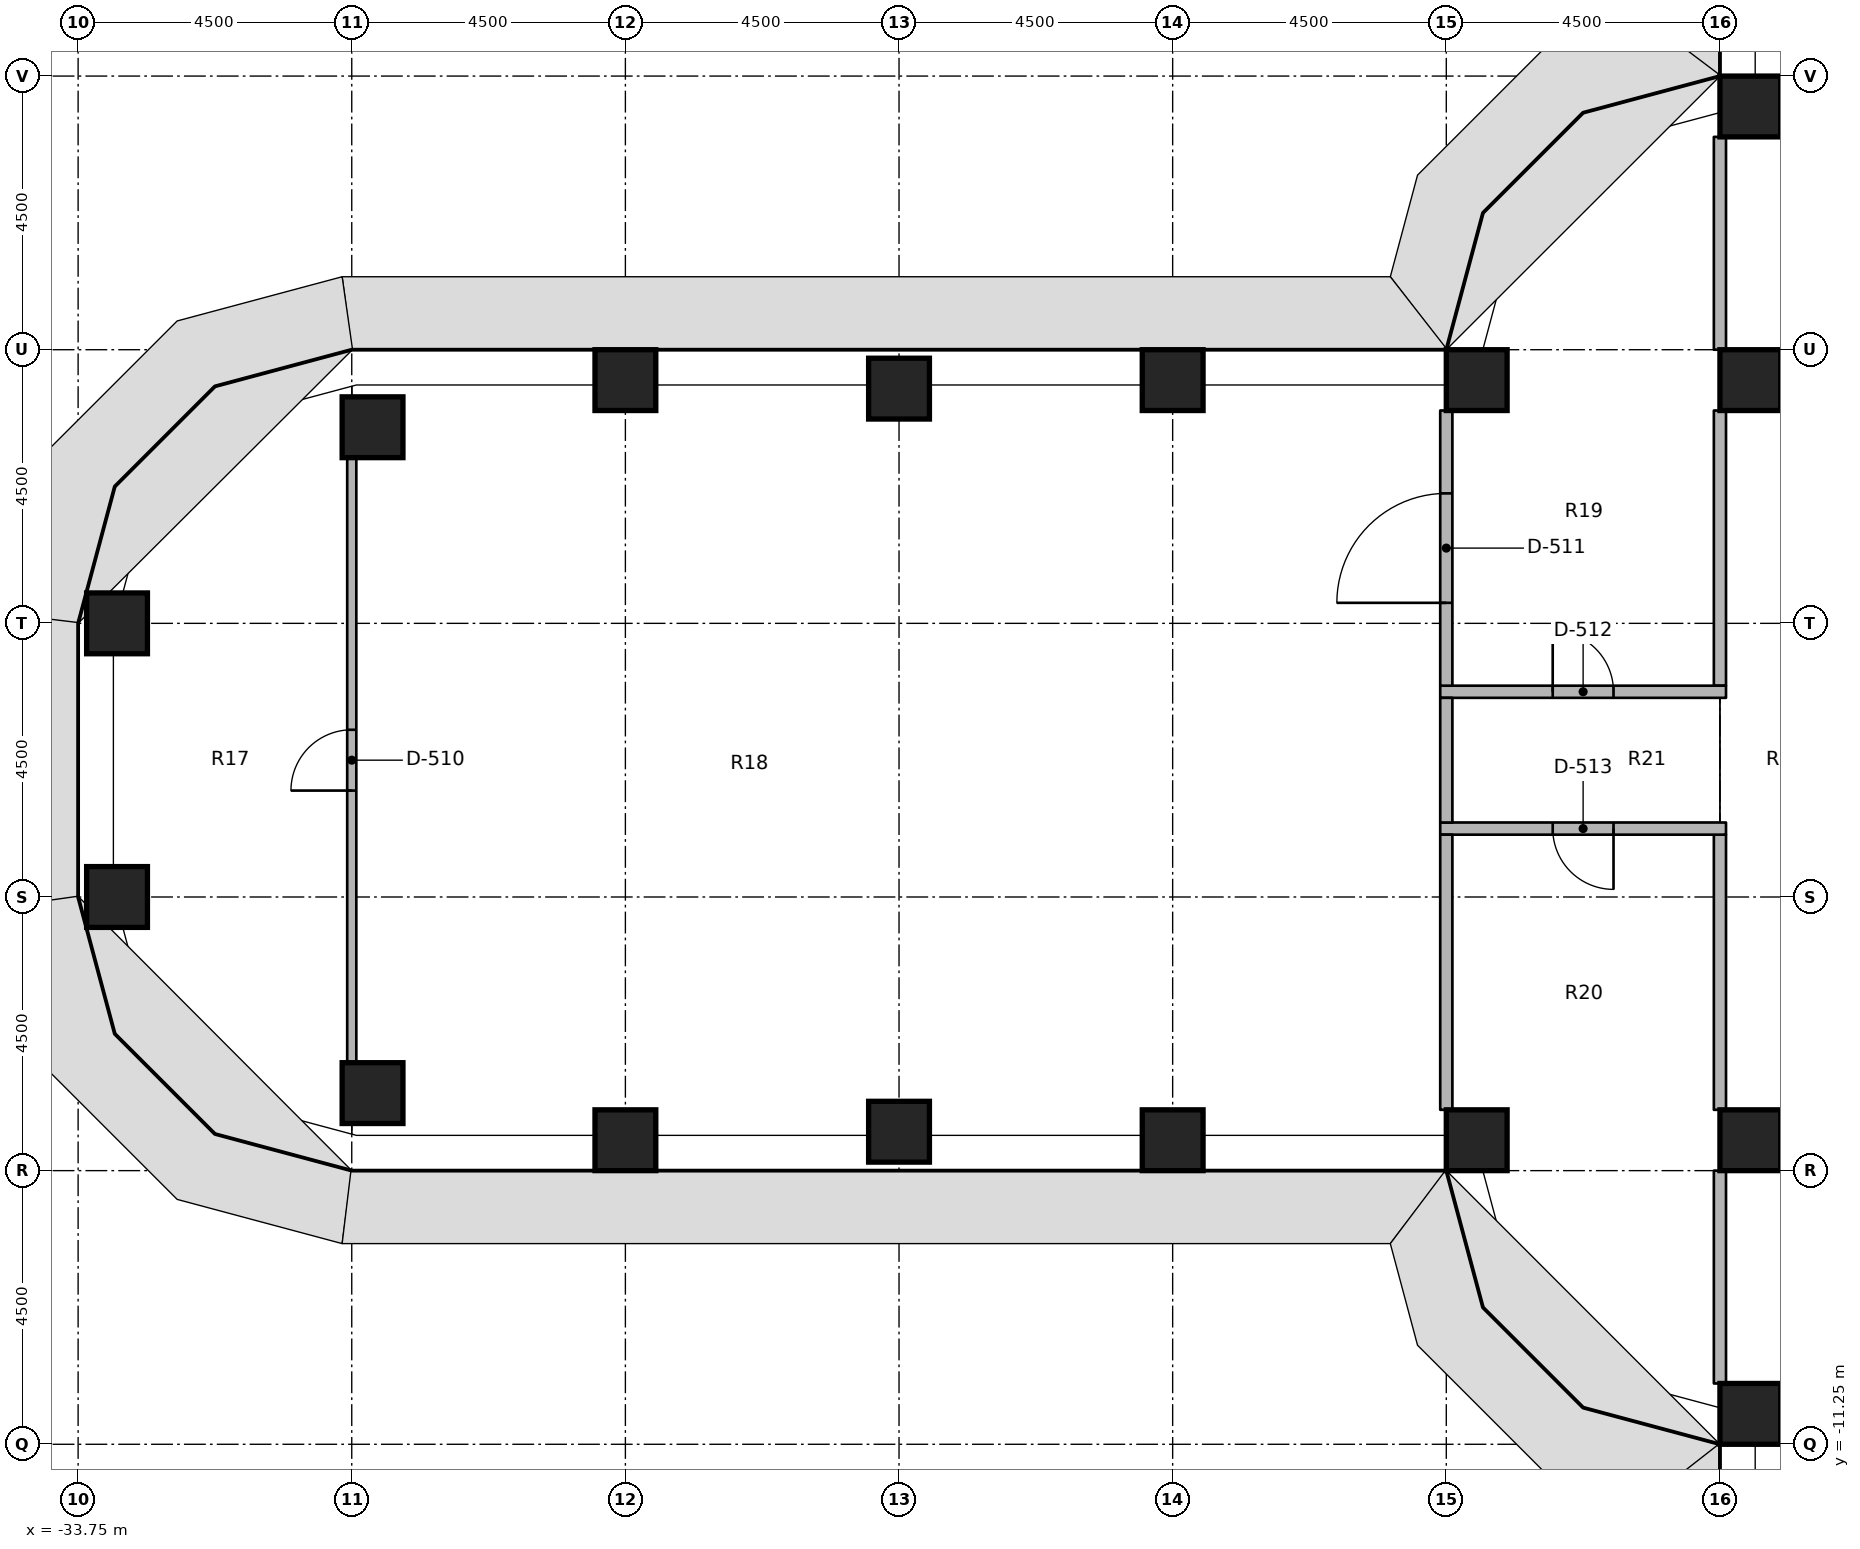
"""IFC4 building model, lengths in metres.
Left out: names, types, materials, properties, quantities, classifications, styles, units other than length and angle.
Written with IfcOpenShell. Run it as: python <this file> out.ifc"""

import sys

from ifc_helpers import new_model, si_unit, direction, frame, frame_2d, origin, origin_2d, place, context, subcontext, project, spatial, rectangle, extrude, element, fill, save


model = new_model("IFC4")
c1 = context("Model", 3, precision=1e-05, world=origin(), true_north=direction((0.0, 1.0)))
c2 = subcontext(c1, "Body", "Model", "MODEL_VIEW")
j1 = project(units=[si_unit("LENGTHUNIT", "METRE"), si_unit("PLANEANGLEUNIT", "RADIAN")], contexts=[c1])
p1 = place(None, origin())
s1 = spatial("IfcSite", under=j1, at=p1, CompositionType="ELEMENT")
p2 = place(p1, origin())
s2 = spatial("IfcBuilding", under=s1, at=p2, CompositionType="ELEMENT")
p3 = place(p2, frame((0.0, 0.0, 69.0)))
s3 = spatial("IfcBuildingStorey", under=s2, at=p3, CompositionType="ELEMENT", Elevation=69.0)
for number, where, z_axis, x_axis in (
    (1, (-33.11, -2.25, 0.0), (0.0, 0.0, 1.0), (1.0, 0.0, 0.0)),
    (2, (-33.11, 2.25, 0.0), (0.0, 0.0, 1.0), (1.0, 0.0, 0.0)),
    (3, (-28.908, -5.475, 0.0), (0.0, 0.0, 1.0), (1.0, 0.0, 0.0)),
    (4, (-28.908, 5.475, 0.0), (0.0, 0.0, 1.0), (1.0, 0.0, 0.0)),
    (5, (-24.75, -6.25, 0.0), (0.0, 0.0, 1.0), (1.0, 0.0, 0.0)),
    (6, (-24.75, 6.25, 0.0), (0.0, 0.0, 1.0), (1.0, 0.0, 0.0)),
    (7, (-20.25, -6.11, 0.0), (0.0, 0.0, 1.0), (1.0, 0.0, 0.0)),
    (8, (-20.25, 6.11, 0.0), (0.0, 0.0, 1.0), (1.0, 0.0, 0.0)),
    (9, (-15.75, -6.25, 0.0), (0.0, 0.0, 1.0), (1.0, 0.0, 0.0)),
    (10, (-15.75, 6.25, 0.0), (0.0, 0.0, 1.0), (1.0, 0.0, 0.0)),
    (11, (-10.75, -6.25, 0.0), (0.0, 0.0, 1.0), (1.0, 0.0, 0.0)),
    (12, (-10.75, 6.25, 0.0), (0.0, 0.0, 1.0), (1.0, 0.0, 0.0)),
    (13, (-6.25, -10.75, 0.0), (0.0, 0.0, 1.0), (1.0, 0.0, 0.0)),
    (14, (-6.25, -6.25, 0.0), (0.0, 0.0, 1.0), (1.0, 0.0, 0.0)),
    (15, (-6.25, 6.25, 0.0), (0.0, 0.0, 1.0), (1.0, 0.0, 0.0)),
    (16, (-6.25, 10.75, 0.0), (0.0, 0.0, 1.0), (1.0, 0.0, 0.0)),
):
    element("IfcColumn", number, at=place(p3, frame(where, z_axis=z_axis, x_axis=x_axis)), inside=s3, PredefinedType="COLUMN", context=c2, shape_type="SweptSolid", body=[
        extrude(rectangle(XDim=1.0, YDim=1.0, at=origin_2d()), origin(), (0.0, 0.0, 1.0), 4.05),
    ])
p4 = place(p3, frame((-6.75, 1.225, 0.0), z_axis=(0.0, 0.0, 1.0), x_axis=(0.0, 1.0, 0.0)))
e17 = element("IfcWall", 17, at=p4, inside=s3, PredefinedType="PARTITIONING", context=c2, shape_type="SweptSolid", body=[
    extrude(rectangle(XDim=4.525, YDim=0.2, at=frame_2d((2.262, 0.0))), origin(), (0.0, 0.0, 1.0), 3.131),
])
for number, where, z_axis, x_axis in (
    (18, (-6.75, 6.75, 0.0), (0.0, 0.0, 1.0), (0.0, 1.0, 0.0)),
    (19, (-6.75, -10.25, 0.0), (0.0, 0.0, 1.0), (0.0, 1.0, 0.0)),
):
    element("IfcWall", number, at=place(p3, frame(where, z_axis=z_axis, x_axis=x_axis)), inside=s3, PredefinedType="PARTITIONING", context=c2, shape_type="SweptSolid", body=[
        extrude(rectangle(XDim=3.5, YDim=0.2, at=frame_2d((1.75, 0.0))), origin(), (0.0, 0.0, 1.0), 3.131),
    ])
p5 = place(p3, frame((-6.75, -5.75, 0.0), z_axis=(0.0, 0.0, 1.0), x_axis=(0.0, 1.0, 0.0)))
e20 = element("IfcWall", 20, at=p5, inside=s3, PredefinedType="PARTITIONING", context=c2, shape_type="SweptSolid", body=[
    extrude(rectangle(XDim=4.525, YDim=0.2, at=frame_2d((2.262, 0.0))), origin(), (0.0, 0.0, 1.0), 3.131),
])
p6 = place(p3, frame((-11.35, 1.125, 0.0), z_axis=(0.0, 0.0, 1.0), x_axis=(1.0, 0.0, 0.0)))
e21 = element("IfcWall", 21, at=p6, inside=s3, PredefinedType="PARTITIONING", context=c2, shape_type="SweptSolid", body=[
    extrude(rectangle(XDim=4.7, YDim=0.2, at=frame_2d((2.35, 0.0))), origin(), (0.0, 0.0, 1.0), 3.131),
])
p7 = place(p6, frame((1.85, 0.0, 0.0)))
e22 = element("IfcOpeningElement", 22, at=p7, cuts=e21, PredefinedType="OPENING", context=c2, shape_type="SweptSolid", body=[
    extrude(rectangle(XDim=1.0, YDim=2.1, at=frame_2d((0.5, 1.05))), frame((0.0, 0.11, 0.0), z_axis=(0.0, -1.0, 0.0), x_axis=(1.0, 0.0, 0.0)), (0.0, 0.0, 1.0), 0.22),
])
p8 = place(p3, frame((-6.65, -1.125, 0.0), z_axis=(0.0, 0.0, 1.0), x_axis=(-1.0, 0.0, 0.0)))
e23 = element("IfcWall", 23, at=p8, inside=s3, PredefinedType="PARTITIONING", context=c2, shape_type="SweptSolid", body=[
    extrude(rectangle(XDim=4.7, YDim=0.2, at=frame_2d((2.35, 0.0))), origin(), (0.0, 0.0, 1.0), 3.131),
])
p9 = place(p8, frame((1.85, 0.0, 0.0)))
e24 = element("IfcOpeningElement", 24, at=p9, cuts=e23, PredefinedType="OPENING", context=c2, shape_type="SweptSolid", body=[
    extrude(rectangle(XDim=1.0, YDim=2.1, at=frame_2d((0.5, 1.05))), frame((0.0, 0.11, 0.0), z_axis=(0.0, -1.0, 0.0), x_axis=(1.0, 0.0, 0.0)), (0.0, 0.0, 1.0), 0.22),
])
p10 = place(p3, frame((-11.25, -1.025, 0.0), z_axis=(0.0, 0.0, 1.0), x_axis=(0.0, 1.0, 0.0)))
e25 = element("IfcWall", 25, at=p10, inside=s3, PredefinedType="PARTITIONING", context=c2, shape_type="SweptSolid", body=[
    extrude(rectangle(XDim=2.05, YDim=0.2, at=frame_2d((1.025, 0.0))), origin(), (0.0, 0.0, 1.0), 3.131),
])
p11 = place(p3, frame((-11.25, 1.225, 0.0), z_axis=(0.0, 0.0, 1.0), x_axis=(0.0, 1.0, 0.0)))
e26 = element("IfcWall", 26, at=p11, inside=s3, PredefinedType="PARTITIONING", context=c2, shape_type="SweptSolid", body=[
    extrude(rectangle(XDim=4.525, YDim=0.2, at=frame_2d((2.262, 0.0))), origin(), (0.0, 0.0, 1.0), 3.131),
])
p12 = place(p11, frame((1.363, 0.0, 0.0)))
e27 = element("IfcOpeningElement", 27, at=p12, cuts=e26, PredefinedType="OPENING", context=c2, shape_type="SweptSolid", body=[
    extrude(rectangle(XDim=1.8, YDim=2.1, at=frame_2d((0.9, 1.05))), frame((0.0, 0.11, 0.0), z_axis=(0.0, -1.0, 0.0), x_axis=(1.0, 0.0, 0.0)), (0.0, 0.0, 1.0), 0.22),
])
p13 = place(p3, frame((-11.25, -5.75, 0.0), z_axis=(0.0, 0.0, 1.0), x_axis=(0.0, 1.0, 0.0)))
e28 = element("IfcWall", 28, at=p13, inside=s3, PredefinedType="PARTITIONING", context=c2, shape_type="SweptSolid", body=[
    extrude(rectangle(XDim=4.525, YDim=0.2, at=frame_2d((2.262, 0.0))), origin(), (0.0, 0.0, 1.0), 3.131),
])
p14 = place(p3, frame((-29.25, -4.975, 0.0), z_axis=(0.0, 0.0, 1.0), x_axis=(0.0, 1.0, 0.0)))
e29 = element("IfcWall", 29, at=p14, inside=s3, PredefinedType="PARTITIONING", context=c2, shape_type="SweptSolid", body=[
    extrude(rectangle(XDim=9.95, YDim=0.15, at=frame_2d((4.975, 0.0))), origin(), (0.0, 0.0, 1.0), 3.131),
])
p15 = place(p14, frame((4.475, 0.0, 0.0)))
e30 = element("IfcOpeningElement", 30, at=p15, cuts=e29, PredefinedType="OPENING", context=c2, shape_type="SweptSolid", body=[
    extrude(rectangle(XDim=1.0, YDim=2.1, at=frame_2d((0.5, 1.05))), frame((0.0, 0.085, 0.0), z_axis=(0.0, -1.0, 0.0), x_axis=(1.0, 0.0, 0.0)), (0.0, 0.0, 1.0), 0.17),
])
p16 = place(p15, origin())
e31 = element("IfcDoor", 31, at=p16, inside=s3, OperationType="SINGLE_SWING_RIGHT", PredefinedType="DOOR", context=c2, shape_type="SweptSolid", body=[
    extrude(rectangle(XDim=1.0, YDim=2.1, at=frame_2d((0.5, 1.05))), frame((0.0, 0.025, 0.0), z_axis=(0.0, -1.0, 0.0), x_axis=(1.0, 0.0, 0.0)), (0.0, 0.0, 1.0), 0.05),
])
fill(e30, e31)
p17 = place(p12, origin())
e32 = element("IfcDoor", 32, at=p17, inside=s3, OperationType="DOUBLE_DOOR_SINGLE_SWING", PredefinedType="DOOR", context=c2, shape_type="SweptSolid", body=[
    extrude(rectangle(XDim=1.8, YDim=2.1, at=frame_2d((0.9, 1.05))), frame((0.0, 0.025, 0.0), z_axis=(0.0, -1.0, 0.0), x_axis=(1.0, 0.0, 0.0)), (0.0, 0.0, 1.0), 0.05),
])
fill(e27, e32)
p18 = place(p7, origin())
e33 = element("IfcDoor", 33, at=p18, inside=s3, OperationType="SINGLE_SWING_RIGHT", PredefinedType="DOOR", context=c2, shape_type="SweptSolid", body=[
    extrude(rectangle(XDim=1.0, YDim=2.1, at=frame_2d((0.5, 1.05))), frame((0.0, 0.025, 0.0), z_axis=(0.0, -1.0, 0.0), x_axis=(1.0, 0.0, 0.0)), (0.0, 0.0, 1.0), 0.05),
])
fill(e22, e33)
p19 = place(p9, origin())
e34 = element("IfcDoor", 34, at=p19, inside=s3, OperationType="SINGLE_SWING_RIGHT", PredefinedType="DOOR", context=c2, shape_type="SweptSolid", body=[
    extrude(rectangle(XDim=1.0, YDim=2.1, at=frame_2d((0.5, 1.05))), frame((0.0, 0.025, 0.0), z_axis=(0.0, -1.0, 0.0), x_axis=(1.0, 0.0, 0.0)), (0.0, 0.0, 1.0), 0.05),
])
fill(e24, e34)
save(model, sys.argv[1])
